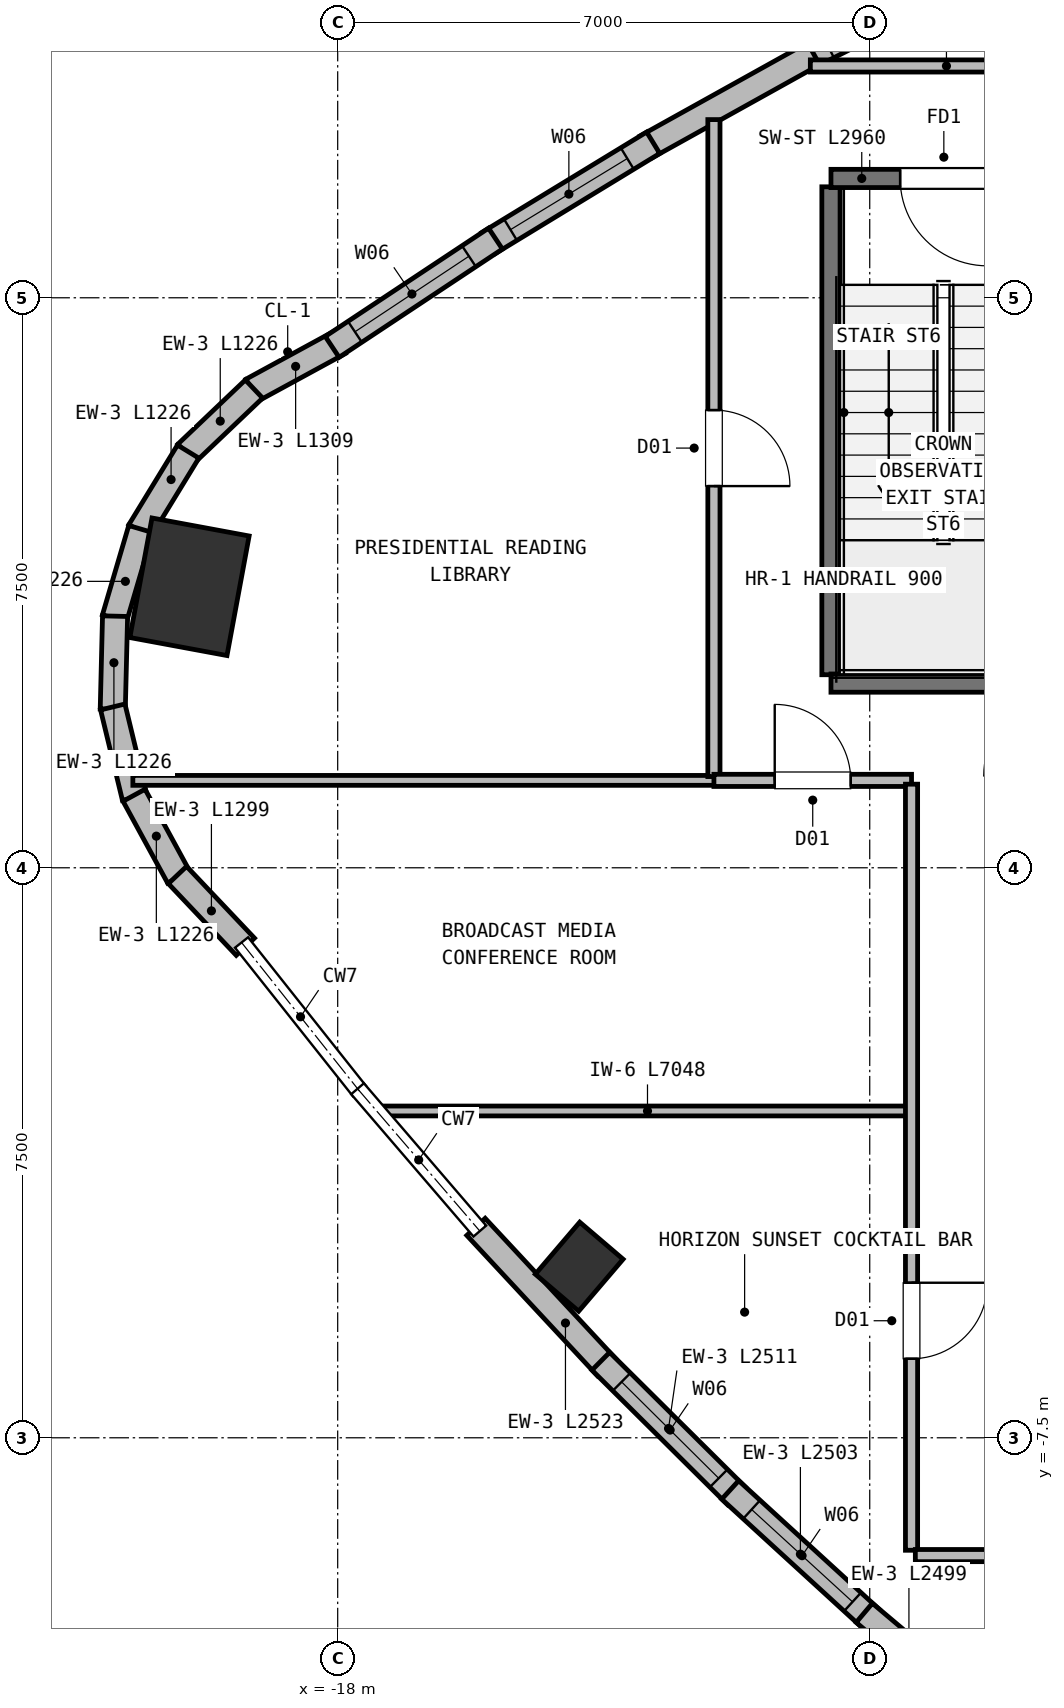
"""IFC4 building model, lengths in metres.
Left out: names, types, materials, properties, quantities, classifications, styles, units other than length and angle.
Written with IfcOpenShell. Run it as: python <this file> out.ifc"""

import sys

from ifc_helpers import new_model, si_unit, direction, frame, frame_2d, origin, origin_2d, place, context, subcontext, project, spatial, rectangle, extrude, element, fill, save


model = new_model("IFC4")
c1 = context("Model", 3, precision=1e-05, world=origin(), true_north=direction((0.0, 1.0)))
c2 = subcontext(c1, "Body", "Model", "MODEL_VIEW")
j1 = project(units=[si_unit("LENGTHUNIT", "METRE"), si_unit("PLANEANGLEUNIT", "RADIAN")], contexts=[c1])
p1 = place(None, origin())
s1 = spatial("IfcSite", under=j1, at=p1, CompositionType="ELEMENT")
p2 = place(p1, origin())
s2 = spatial("IfcBuilding", under=s1, at=p2, CompositionType="ELEMENT")
p3 = place(p2, frame((0.0, 0.0, 299.2)))
s3 = spatial("IfcBuildingStorey", under=s2, at=p3, CompositionType="ELEMENT", Elevation=299.2)
p4 = place(p3, frame((-19.95, 3.698, 0.0), z_axis=(0.0, 0.0, 1.0), x_axis=(-0.983254907564, 0.182235525492, 0.0)))
e1 = element("IfcColumn", 1, at=p4, inside=s3, PredefinedType="COLUMN", context=c2, shape_type="SweptSolid", body=[
    extrude(rectangle(XDim=1.3, YDim=1.6, at=origin_2d()), origin(), (0.0, 0.0, 1.0), 4.4),
])
p5 = place(p3, frame((-14.823, -5.249, 0.0), z_axis=(0.0, 0.0, 1.0), x_axis=(-0.7604059656, 0.64944804833, 0.0)))
e2 = element("IfcColumn", 2, at=p5, inside=s3, PredefinedType="COLUMN", context=c2, shape_type="SweptSolid", body=[
    extrude(rectangle(XDim=0.75, YDim=0.9, at=origin_2d()), origin(), (0.0, 0.0, 1.0), 4.4),
])
p6 = place(p3, frame((-19.128, 6.284, 0.0), z_axis=(0.0, 0.0, 1.0), x_axis=(0.878173375728, 0.478342473719, 0.0)))
e3 = element("IfcWall", 3, at=p6, inside=s3, PredefinedType="SOLIDWALL", context=c2, shape_type="SweptSolid", body=[
    extrude(rectangle(XDim=1.309, YDim=0.33, at=frame_2d((0.655, 0.0))), origin(), (0.0, 0.0, 1.0), 4.12),
])
for number, where, z_axis, x_axis in (
    (4, (-19.989, 5.454, 0.0), (0.0, 0.0, 1.0), (0.724, 0.69, 0.0)),
    (5, (-20.606, 4.43, 0.0), (0.0, 0.0, 1.0), (0.521, 0.853, 0.0)),
    (6, (-20.937, 3.281, 0.0), (0.0, 0.0, 1.0), (0.282, 0.959, 0.0)),
    (7, (-20.959, 2.085, 0.0), (0.0, 0.0, 1.0), (0.025, 1.0, 0.0)),
    (8, (-20.671, 0.924, 0.0), (0.0, 0.0, 1.0), (-0.235, 0.972, 0.0)),
):
    element("IfcWall", number, at=place(p3, frame(where, z_axis=z_axis, x_axis=x_axis)), inside=s3, PredefinedType="SOLIDWALL", context=c2, shape_type="SweptSolid", body=[
        extrude(rectangle(XDim=1.226, YDim=0.33, at=frame_2d((0.613, 0.0))), origin(), (0.0, 0.0, 1.0), 4.12),
    ])
p7 = place(p3, frame((-20.093, -0.122, 0.0), z_axis=(0.0, 0.0, 1.0), x_axis=(-0.478321862725, 0.878184602256, 0.0)))
e9 = element("IfcWall", 9, at=p7, inside=s3, PredefinedType="SOLIDWALL", context=c2, shape_type="SweptSolid", body=[
    extrude(rectangle(XDim=1.226, YDim=0.33, at=frame_2d((0.613, 0.0))), origin(), (0.0, 0.0, 1.0), 4.12),
])
p8 = place(p3, frame((-19.215, -1.039, 0.0), z_axis=(0.0, 0.0, 1.0), x_axis=(-0.687489239636, 0.726194564414, 0.0)))
e10 = element("IfcWall", 10, at=p8, inside=s3, PredefinedType="SOLIDWALL", context=c2, shape_type="SweptSolid", body=[
    extrude(rectangle(XDim=1.299, YDim=0.33, at=frame_2d((0.65, 0.0))), origin(), (0.0, 0.0, 1.0), 4.12),
])
p9 = place(p3, frame((-14.462, -6.572, 0.0), z_axis=(0.0, 0.0, 1.0), x_axis=(-0.681100323402, 0.732190104728, 0.0)))
e11 = element("IfcWall", 11, at=p9, inside=s3, PredefinedType="SOLIDWALL", context=c2, shape_type="SweptSolid", body=[
    extrude(rectangle(XDim=2.523, YDim=0.33, at=frame_2d((1.262, 0.0))), origin(), (0.0, 0.0, 1.0), 4.12),
])
p10 = place(p3, frame((-12.756, -8.262, 0.0), z_axis=(0.0, 0.0, 1.0), x_axis=(-0.709823779942, 0.704379302243, 0.0)))
e12 = element("IfcWall", 12, at=p10, inside=s3, PredefinedType="SOLIDWALL", context=c2, shape_type="SweptSolid", body=[
    extrude(rectangle(XDim=2.511, YDim=0.33, at=frame_2d((1.256, 0.0))), origin(), (0.0, 0.0, 1.0), 4.12),
])
p11 = place(p10, frame((0.326, 0.0, 0.72)))
e13 = element("IfcOpeningElement", 13, at=p11, cuts=e12, PredefinedType="OPENING", context=c2, shape_type="SweptSolid", body=[
    extrude(rectangle(XDim=1.8, YDim=2.25, at=frame_2d((0.9, 1.125))), frame((0.0, 0.175, 0.0), z_axis=(0.0, -1.0, 0.0), x_axis=(1.0, 0.0, 0.0)), (0.0, 0.0, 1.0), 0.35),
])
p12 = place(p3, frame((-10.989, -9.876, 0.0), z_axis=(0.0, 0.0, 1.0), x_axis=(-0.737627628948, 0.675207731748, 0.0)))
e14 = element("IfcWall", 14, at=p12, inside=s3, PredefinedType="SOLIDWALL", context=c2, shape_type="SweptSolid", body=[
    extrude(rectangle(XDim=2.503, YDim=0.33, at=frame_2d((1.251, 0.0))), origin(), (0.0, 0.0, 1.0), 4.12),
])
p13 = place(p12, frame((0.322, 0.0, 0.72)))
e15 = element("IfcOpeningElement", 15, at=p13, cuts=e14, PredefinedType="OPENING", context=c2, shape_type="SweptSolid", body=[
    extrude(rectangle(XDim=1.8, YDim=2.25, at=frame_2d((0.9, 1.125))), frame((0.0, 0.175, 0.0), z_axis=(0.0, -1.0, 0.0), x_axis=(1.0, 0.0, 0.0)), (0.0, 0.0, 1.0), 0.35),
])
p14 = place(p3, frame((-9.161, -11.415, 0.0), z_axis=(0.0, 0.0, 1.0), x_axis=(-0.764315556833, 0.644842406781, 0.0)))
e16 = element("IfcWall", 16, at=p14, inside=s3, PredefinedType="SOLIDWALL", context=c2, shape_type="SweptSolid", body=[
    extrude(rectangle(XDim=2.499, YDim=0.33, at=frame_2d((1.25, 0.0))), origin(), (0.0, 0.0, 1.0), 4.12),
])
p15 = place(p3, frame((-11.836, 10.659, 0.0), z_axis=(0.0, 0.0, 1.0), x_axis=(0.892552621867, 0.450943252747, 0.0)))
e17 = element("IfcWall", 17, at=p15, inside=s3, PredefinedType="SOLIDWALL", context=c2, shape_type="SweptSolid", body=[
    extrude(rectangle(XDim=2.511, YDim=0.33, at=frame_2d((1.255, 0.0))), origin(), (0.0, 0.0, 1.0), 4.12),
])
p16 = place(p15, frame((0.325, 0.0, 0.72)))
e18 = element("IfcOpeningElement", 18, at=p16, cuts=e17, PredefinedType="OPENING", context=c2, shape_type="SweptSolid", body=[
    extrude(rectangle(XDim=1.8, YDim=2.25, at=frame_2d((0.9, 1.125))), frame((0.0, 0.175, 0.0), z_axis=(0.0, -1.0, 0.0), x_axis=(1.0, 0.0, 0.0)), (0.0, 0.0, 1.0), 0.35),
])
p17 = place(p3, frame((-13.944, 9.485, 0.0), z_axis=(0.0, 0.0, 1.0), x_axis=(0.873960918974, 0.485996205856, 0.0)))
e19 = element("IfcWall", 19, at=p17, inside=s3, PredefinedType="SOLIDWALL", context=c2, shape_type="SweptSolid", body=[
    extrude(rectangle(XDim=2.523, YDim=0.33, at=frame_2d((1.261, 0.0))), origin(), (0.0, 0.0, 1.0), 4.12),
])
p18 = place(p3, frame((-16.017, 8.219, 0.0), z_axis=(0.0, 0.0, 1.0), x_axis=(0.854010909552, 0.520255097395, 0.0)))
e20 = element("IfcWall", 20, at=p18, inside=s3, PredefinedType="SOLIDWALL", context=c2, shape_type="SweptSolid", body=[
    extrude(rectangle(XDim=2.538, YDim=0.33, at=frame_2d((1.269, 0.0))), origin(), (0.0, 0.0, 1.0), 4.12),
])
p19 = place(p18, frame((0.339, 0.0, 0.72)))
e21 = element("IfcOpeningElement", 21, at=p19, cuts=e20, PredefinedType="OPENING", context=c2, shape_type="SweptSolid", body=[
    extrude(rectangle(XDim=1.8, YDim=2.25, at=frame_2d((0.9, 1.125))), frame((0.0, 0.175, 0.0), z_axis=(0.0, -1.0, 0.0), x_axis=(1.0, 0.0, 0.0)), (0.0, 0.0, 1.0), 0.35),
])
p20 = place(p3, frame((-18.073, 6.854, 0.0), z_axis=(0.0, 0.0, 1.0), x_axis=(0.833460819708, 0.552578557322, 0.0)))
e22 = element("IfcWall", 22, at=p20, inside=s3, PredefinedType="SOLIDWALL", context=c2, shape_type="SweptSolid", body=[
    extrude(rectangle(XDim=2.578, YDim=0.33, at=frame_2d((1.289, 0.0))), origin(), (0.0, 0.0, 1.0), 4.12),
])
p21 = place(p20, frame((0.359, 0.0, 0.72)))
e23 = element("IfcOpeningElement", 23, at=p21, cuts=e22, PredefinedType="OPENING", context=c2, shape_type="SweptSolid", body=[
    extrude(rectangle(XDim=1.8, YDim=2.25, at=frame_2d((0.9, 1.125))), frame((0.0, 0.175, 0.0), z_axis=(0.0, -1.0, 0.0), x_axis=(1.0, 0.0, 0.0)), (0.0, 0.0, 1.0), 0.35),
])
p22 = place(p3, frame((-11.51, 2.54, 0.0), z_axis=(0.0, 0.0, 1.0), x_axis=(0.0, 1.0, 0.0)))
e24 = element("IfcWall", 24, at=p22, inside=s3, PredefinedType="SHEAR", context=c2, shape_type="SweptSolid", body=[
    extrude(rectangle(XDim=6.42, YDim=0.24, at=frame_2d((3.21, 0.0))), origin(), (0.0, 0.0, 1.0), 4.12),
])
p23 = place(p3, frame((-11.51, 2.43, 0.0), z_axis=(0.0, 0.0, 1.0), x_axis=(1.0, 0.0, 0.0)))
e25 = element("IfcWall", 25, at=p23, inside=s3, PredefinedType="SHEAR", context=c2, shape_type="SweptSolid", body=[
    extrude(rectangle(XDim=2.96, YDim=0.24, at=frame_2d((1.48, 0.0))), origin(), (0.0, 0.0, 1.0), 4.12),
])
p24 = place(p3, frame((-8.55, 9.07, 0.0), z_axis=(0.0, 0.0, 1.0), x_axis=(-1.0, 0.0, 0.0)))
e26 = element("IfcWall", 26, at=p24, inside=s3, PredefinedType="SHEAR", context=c2, shape_type="SweptSolid", body=[
    extrude(rectangle(XDim=2.96, YDim=0.24, at=frame_2d((1.48, 0.0))), origin(), (0.0, 0.0, 1.0), 4.12),
])
p25 = place(p24, frame((0.9, 0.0, 0.0)))
e27 = element("IfcOpeningElement", 27, at=p25, cuts=e26, PredefinedType="OPENING", context=c2, shape_type="SweptSolid", body=[
    extrude(rectangle(XDim=1.15, YDim=2.15, at=frame_2d((0.575, 1.075))), frame((0.0, 0.13, 0.0), z_axis=(0.0, -1.0, 0.0), x_axis=(1.0, 0.0, 0.0)), (0.0, 0.0, 1.0), 0.26),
])
p26 = place(p3, frame((-17.448, -3.2, 0.0), z_axis=(0.0, 0.0, 1.0), x_axis=(1.0, 0.0, 0.0)))
e28 = element("IfcWall", 28, at=p26, inside=s3, PredefinedType="PARTITIONING", context=c2, shape_type="SweptSolid", body=[
    extrude(rectangle(XDim=7.048, YDim=0.13, at=frame_2d((3.524, 0.0))), origin(), (0.0, 0.0, 1.0), 4.12),
])
p27 = place(p3, frame((-20.695, 1.15, 0.0), z_axis=(0.0, 0.0, 1.0), x_axis=(1.0, 0.0, 0.0)))
e29 = element("IfcWall", 29, at=p27, inside=s3, PredefinedType="PARTITIONING", context=c2, shape_type="SweptSolid", body=[
    extrude(rectangle(XDim=7.695, YDim=0.13, at=frame_2d((3.847, 0.0))), origin(), (0.0, 0.0, 1.0), 4.12),
])
p28 = place(p3, frame((-7.12, 10.55, 0.0), z_axis=(0.0, 0.0, 1.0), x_axis=(-1.0, 0.0, 0.0)))
e30 = element("IfcWall", 30, at=p28, inside=s3, PredefinedType="PARTITIONING", context=c2, shape_type="SweptSolid", body=[
    extrude(rectangle(XDim=4.661, YDim=0.16, at=frame_2d((2.331, 0.0))), origin(), (0.0, 0.0, 1.0), 4.12),
])
p29 = place(p3, frame((-13.05, 9.844, 0.0), z_axis=(0.0, 0.0, 1.0), x_axis=(0.0, -1.0, 0.0)))
e31 = element("IfcWall", 31, at=p29, inside=s3, PredefinedType="PARTITIONING", context=c2, shape_type="SweptSolid", body=[
    extrude(rectangle(XDim=8.645, YDim=0.16, at=frame_2d((4.322, 0.0))), origin(), (0.0, 0.0, 1.0), 4.12),
])
p30 = place(p29, frame((3.822, 0.0, 0.0)))
e32 = element("IfcOpeningElement", 32, at=p30, cuts=e31, PredefinedType="OPENING", context=c2, shape_type="SweptSolid", body=[
    extrude(rectangle(XDim=1.0, YDim=2.15, at=frame_2d((0.5, 1.075))), frame((0.0, 0.09, 0.0), z_axis=(0.0, -1.0, 0.0), x_axis=(1.0, 0.0, 0.0)), (0.0, 0.0, 1.0), 0.18),
])
p31 = place(p3, frame((-13.05, 1.15, 0.0), z_axis=(0.0, 0.0, 1.0), x_axis=(1.0, 0.0, 0.0)))
e33 = element("IfcWall", 33, at=p31, inside=s3, PredefinedType="PARTITIONING", context=c2, shape_type="SweptSolid", body=[
    extrude(rectangle(XDim=2.6, YDim=0.16, at=frame_2d((1.3, 0.0))), origin(), (0.0, 0.0, 1.0), 3.7),
])
p32 = place(p31, frame((0.8, 0.0, 0.0)))
e34 = element("IfcOpeningElement", 34, at=p32, cuts=e33, PredefinedType="OPENING", context=c2, shape_type="SweptSolid", body=[
    extrude(rectangle(XDim=1.0, YDim=2.15, at=frame_2d((0.5, 1.075))), frame((0.0, 0.09, 0.0), z_axis=(0.0, -1.0, 0.0), x_axis=(1.0, 0.0, 0.0)), (0.0, 0.0, 1.0), 0.18),
])
p33 = place(p3, frame((-10.45, 1.1, 0.0), z_axis=(0.0, 0.0, 1.0), x_axis=(0.0, -1.0, 0.0)))
e35 = element("IfcWall", 35, at=p33, inside=s3, PredefinedType="PARTITIONING", context=c2, shape_type="SweptSolid", body=[
    extrude(rectangle(XDim=10.08, YDim=0.16, at=frame_2d((5.04, 0.0))), origin(), (0.0, 0.0, 1.0), 4.12),
])
p34 = place(p33, frame((6.56, 0.0, 0.0)))
e36 = element("IfcOpeningElement", 36, at=p34, cuts=e35, PredefinedType="OPENING", context=c2, shape_type="SweptSolid", body=[
    extrude(rectangle(XDim=1.0, YDim=2.15, at=frame_2d((0.5, 1.075))), frame((0.0, 0.09, 0.0), z_axis=(0.0, -1.0, 0.0), x_axis=(1.0, 0.0, 0.0)), (0.0, 0.0, 1.0), 0.18),
])
p35 = place(p3, frame((-10.4, -9.05, 0.0), z_axis=(0.0, 0.0, 1.0), x_axis=(1.0, 0.0, 0.0)))
e37 = element("IfcWall", 37, at=p35, inside=s3, PredefinedType="PARTITIONING", context=c2, shape_type="SweptSolid", body=[
    extrude(rectangle(XDim=19.1, YDim=0.16, at=frame_2d((9.55, 0.0))), origin(), (0.0, 0.0, 1.0), 4.12),
])
p36 = place(p35, frame((6.03, 0.0, 0.0)))
e38 = element("IfcOpeningElement", 38, at=p36, cuts=e37, PredefinedType="OPENING", context=c2, shape_type="SweptSolid", body=[
    extrude(rectangle(XDim=1.0, YDim=2.15, at=frame_2d((0.5, 1.075))), frame((0.0, 0.09, 0.0), z_axis=(0.0, -1.0, 0.0), x_axis=(1.0, 0.0, 0.0)), (0.0, 0.0, 1.0), 0.18),
])
p37 = place(p35, frame((13.9, 0.0, 0.0)))
e39 = element("IfcOpeningElement", 39, at=p37, cuts=e37, PredefinedType="OPENING", context=c2, shape_type="SweptSolid", body=[
    extrude(rectangle(XDim=0.95, YDim=2.1, at=frame_2d((0.475, 1.05))), frame((0.0, 0.09, 0.0), z_axis=(0.0, -1.0, 0.0), x_axis=(1.0, 0.0, 0.0)), (0.0, 0.0, 1.0), 0.18),
])
p38 = place(p35, frame((16.92, 0.0, 0.0)))
e40 = element("IfcOpeningElement", 40, at=p38, cuts=e37, PredefinedType="OPENING", context=c2, shape_type="SweptSolid", body=[
    extrude(rectangle(XDim=0.95, YDim=2.1, at=frame_2d((0.475, 1.05))), frame((0.0, 0.09, 0.0), z_axis=(0.0, -1.0, 0.0), x_axis=(1.0, 0.0, 0.0)), (0.0, 0.0, 1.0), 0.18),
])
p39 = place(p11, origin())
e41 = element("IfcWindow", 41, at=p39, inside=s3, PartitioningType="SINGLE_PANEL", PredefinedType="WINDOW", context=c2, shape_type="SweptSolid", body=[
    extrude(rectangle(XDim=1.8, YDim=2.25, at=frame_2d((0.9, 1.125))), frame((0.0, 0.03, 0.0), z_axis=(0.0, -1.0, 0.0), x_axis=(1.0, 0.0, 0.0)), (0.0, 0.0, 1.0), 0.06),
])
fill(e13, e41)
p40 = place(p13, origin())
e42 = element("IfcWindow", 42, at=p40, inside=s3, PartitioningType="SINGLE_PANEL", PredefinedType="WINDOW", context=c2, shape_type="SweptSolid", body=[
    extrude(rectangle(XDim=1.8, YDim=2.25, at=frame_2d((0.9, 1.125))), frame((0.0, 0.03, 0.0), z_axis=(0.0, -1.0, 0.0), x_axis=(1.0, 0.0, 0.0)), (0.0, 0.0, 1.0), 0.06),
])
fill(e15, e42)
p41 = place(p19, origin())
e43 = element("IfcWindow", 43, at=p41, inside=s3, PartitioningType="SINGLE_PANEL", PredefinedType="WINDOW", context=c2, shape_type="SweptSolid", body=[
    extrude(rectangle(XDim=1.8, YDim=2.25, at=frame_2d((0.9, 1.125))), frame((0.0, 0.03, 0.0), z_axis=(0.0, -1.0, 0.0), x_axis=(1.0, 0.0, 0.0)), (0.0, 0.0, 1.0), 0.06),
])
fill(e21, e43)
p42 = place(p21, origin())
e44 = element("IfcWindow", 44, at=p42, inside=s3, PartitioningType="SINGLE_PANEL", PredefinedType="WINDOW", context=c2, shape_type="SweptSolid", body=[
    extrude(rectangle(XDim=1.8, YDim=2.25, at=frame_2d((0.9, 1.125))), frame((0.0, 0.03, 0.0), z_axis=(0.0, -1.0, 0.0), x_axis=(1.0, 0.0, 0.0)), (0.0, 0.0, 1.0), 0.06),
])
fill(e23, e44)
p43 = place(p25, origin())
e45 = element("IfcDoor", 45, at=p43, inside=s3, OperationType="SINGLE_SWING_LEFT", PredefinedType="DOOR", context=c2, shape_type="SweptSolid", body=[
    extrude(rectangle(XDim=1.15, YDim=2.15, at=frame_2d((0.575, 1.075))), frame((0.0, 0.025, 0.0), z_axis=(0.0, -1.0, 0.0), x_axis=(1.0, 0.0, 0.0)), (0.0, 0.0, 1.0), 0.05),
])
fill(e27, e45)
p44 = place(p32, origin())
e46 = element("IfcDoor", 46, at=p44, inside=s3, OperationType="SINGLE_SWING_LEFT", PredefinedType="DOOR", context=c2, shape_type="SweptSolid", body=[
    extrude(rectangle(XDim=1.0, YDim=2.15, at=frame_2d((0.5, 1.075))), frame((0.0, 0.025, 0.0), z_axis=(0.0, -1.0, 0.0), x_axis=(1.0, 0.0, 0.0)), (0.0, 0.0, 1.0), 0.05),
])
fill(e34, e46)
p45 = place(p34, origin())
e47 = element("IfcDoor", 47, at=p45, inside=s3, OperationType="SINGLE_SWING_LEFT", PredefinedType="DOOR", context=c2, shape_type="SweptSolid", body=[
    extrude(rectangle(XDim=1.0, YDim=2.15, at=frame_2d((0.5, 1.075))), frame((0.0, 0.025, 0.0), z_axis=(0.0, -1.0, 0.0), x_axis=(1.0, 0.0, 0.0)), (0.0, 0.0, 1.0), 0.05),
])
fill(e36, e47)
p46 = place(p30, origin())
e48 = element("IfcDoor", 48, at=p46, inside=s3, OperationType="SINGLE_SWING_RIGHT", PredefinedType="DOOR", context=c2, shape_type="SweptSolid", body=[
    extrude(rectangle(XDim=1.0, YDim=2.15, at=frame_2d((0.5, 1.075))), frame((0.0, 0.025, 0.0), z_axis=(0.0, -1.0, 0.0), x_axis=(1.0, 0.0, 0.0)), (0.0, 0.0, 1.0), 0.05),
])
fill(e32, e48)
save(model, sys.argv[1])
